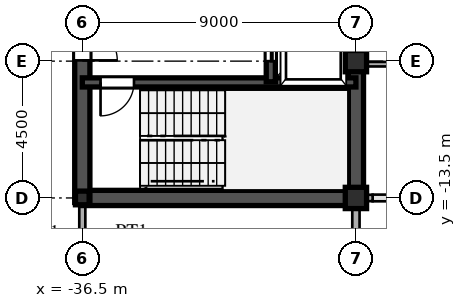
"""IFC4 building model, lengths in metres.
Left out: names, types, materials, properties, quantities, classifications, styles, units other than length and angle.
Written with IfcOpenShell. Run it as: python <this file> out.ifc"""

import sys

from ifc_helpers import new_model, si_unit, direction, frame, frame_2d, origin, origin_2d, place, context, subcontext, project, spatial, rectangle, hollow_rectangle, i_section, extrude, source, transform, mapped, element, fill, save


model = new_model("IFC4")
c1 = context("Model", 3, precision=1e-05, world=origin(), true_north=direction((0.0, 1.0)))
c2 = subcontext(c1, "Body", "Model", "MODEL_VIEW")
j1 = project(units=[si_unit("LENGTHUNIT", "METRE"), si_unit("PLANEANGLEUNIT", "RADIAN")], contexts=[c1])
p1 = place(None, origin())
s1 = spatial("IfcSite", under=j1, at=p1, CompositionType="ELEMENT")
p2 = place(p1, origin())
s2 = spatial("IfcBuilding", under=s1, at=p2, CompositionType="ELEMENT")
p3 = place(p2, frame((0.0, 0.0, 265.65)))
s3 = spatial("IfcBuildingStorey", under=s2, at=p3, CompositionType="ELEMENT", Elevation=265.65)
m1 = source(origin(), c2, "Body", "SweptSolid", [
    extrude(hollow_rectangle(XDim=0.7, YDim=0.7, WallThickness=0.03, at=origin_2d()), origin(), (0.0, 0.0, 1.0), 3.75),
])
for number, where, z_axis, x_axis in (
    (1, (-27.5, -13.5, 0.0), (0.0, 0.0, 1.0), (1.0, 0.0, 0.0)),
    (2, (-27.5, -9.0, 0.0), (0.0, 0.0, 1.0), (1.0, 0.0, 0.0)),
):
    element("IfcColumn", number, at=place(p3, frame(where, z_axis=z_axis, x_axis=x_axis)), inside=s3, PredefinedType="COLUMN", context=c2, shape_type="MappedRepresentation", body=[
        mapped(m1, transform((0.0, 0.0, 0.0), scale=1.0)),
    ])
m2 = source(origin(), c2, "Body", "SweptSolid", [
    extrude(i_section(OverallWidth=0.45, OverallDepth=0.45, WebThickness=0.016, FlangeThickness=0.025, at=origin_2d()), origin(), (0.0, 0.0, 1.0), 3.75),
])
p4 = place(p3, frame((-36.5, -13.5, 0.0), z_axis=(0.0, 0.0, 1.0), x_axis=(1.0, 0.0, 0.0)))
e3 = element("IfcColumn", 3, at=p4, inside=s3, PredefinedType="COLUMN", context=c2, shape_type="MappedRepresentation", body=[
    mapped(m2, transform((0.0, 0.0, 0.0), scale=1.0)),
])
p5 = place(p3, frame((-27.5, -15.98, 0.0), z_axis=(0.0, 0.0, 1.0), x_axis=(0.0, 1.0, 0.0)))
e4 = element("IfcWall", 4, at=p5, inside=s3, PredefinedType="SOLIDWALL", context=c2, shape_type="SweptSolid", body=[
    extrude(rectangle(XDim=1.605, YDim=0.24, at=frame_2d((0.803, 0.0))), origin(), (0.0, 0.0, 1.0), 3.49),
])
p6 = place(p3, frame((-27.5, -14.375, 0.0), z_axis=(0.0, 0.0, 1.0), x_axis=(0.0, 1.0, 0.0)))
e5 = element("IfcWall", 5, at=p6, inside=s3, PredefinedType="SOLIDWALL", context=c2, shape_type="SweptSolid", body=[
    extrude(rectangle(XDim=0.62, YDim=0.24, at=frame_2d((0.31, 0.0))), origin(), (0.0, 0.0, 1.0), 2.99),
])
p7 = place(p3, frame((-27.49, -13.5, 0.0), z_axis=(0.0, 0.0, 1.0), x_axis=(1.0, 0.0, 0.0)))
e6 = element("IfcWall", 6, at=p7, inside=s3, PredefinedType="SOLIDWALL", context=c2, shape_type="SweptSolid", body=[
    extrude(rectangle(XDim=0.54, YDim=0.21, at=frame_2d((0.27, 0.0))), origin(), (0.0, 0.0, 1.0), 2.99),
])
p8 = place(p3, frame((-27.5, -13.5, 0.0), z_axis=(0.0, 0.0, 1.0), x_axis=(0.0, 1.0, 0.0)))
e7 = element("IfcWall", 7, at=p8, inside=s3, PredefinedType="SHEAR", context=c2, shape_type="SweptSolid", body=[
    extrude(rectangle(XDim=12.2, YDim=0.5, at=frame_2d((6.1, 0.0))), origin(), (0.0, 0.0, 1.0), 3.49),
])
p9 = place(p3, frame((-36.5, -13.5, 0.0), z_axis=(0.0, 0.0, 1.0), x_axis=(1.0, 0.0, 0.0)))
e8 = element("IfcWall", 8, at=p9, inside=s3, PredefinedType="SHEAR", context=c2, shape_type="SweptSolid", body=[
    extrude(rectangle(XDim=9.0, YDim=0.5, at=frame_2d((4.5, 0.0))), origin(), (0.0, 0.0, 1.0), 3.49),
])
p10 = place(p3, frame((-36.5, -13.65, 0.0), z_axis=(0.0, 0.0, 1.0), x_axis=(0.0, 1.0, 0.0)))
e9 = element("IfcWall", 9, at=p10, inside=s3, PredefinedType="SHEAR", context=c2, shape_type="SweptSolid", body=[
    extrude(rectangle(XDim=7.15, YDim=0.5, at=frame_2d((3.575, 0.0))), origin(), (0.0, 0.0, 1.0), 3.49),
])
p11 = place(p10, frame((4.675, 0.0, 0.0)))
e10 = element("IfcOpeningElement", 10, at=p11, cuts=e9, PredefinedType="OPENING", context=c2, shape_type="SweptSolid", body=[
    extrude(rectangle(XDim=1.15, YDim=2.2, at=frame_2d((0.575, 1.1))), frame((0.0, 0.26, 0.0), z_axis=(0.0, -1.0, 0.0), x_axis=(1.0, 0.0, 0.0)), (0.0, 0.0, 1.0), 0.52),
])
p12 = place(p3, frame((-36.5, -9.7, 0.0), z_axis=(0.0, 0.0, 1.0), x_axis=(1.0, 0.0, 0.0)))
e11 = element("IfcWall", 11, at=p12, inside=s3, PredefinedType="SHEAR", context=c2, shape_type="SweptSolid", body=[
    extrude(rectangle(XDim=9.0, YDim=0.3, at=frame_2d((4.5, 0.0))), origin(), (0.0, 0.0, 1.0), 3.49),
])
p13 = place(p12, frame((0.6, 0.0, 0.0)))
e12 = element("IfcOpeningElement", 12, at=p13, cuts=e11, PredefinedType="OPENING", context=c2, shape_type="SweptSolid", body=[
    extrude(rectangle(XDim=1.1, YDim=2.2, at=frame_2d((0.55, 1.1))), frame((0.0, 0.16, 0.0), z_axis=(0.0, -1.0, 0.0), x_axis=(1.0, 0.0, 0.0)), (0.0, 0.0, 1.0), 0.32),
])
p14 = place(p3, frame((-30.3, -9.68, 0.0), z_axis=(0.0, 0.0, 1.0), x_axis=(0.0, 1.0, 0.0)))
e13 = element("IfcWall", 13, at=p14, inside=s3, PredefinedType="SHEAR", context=c2, shape_type="SweptSolid", body=[
    extrude(rectangle(XDim=2.56, YDim=0.3, at=frame_2d((1.28, 0.0))), origin(), (0.0, 0.0, 1.0), 3.49),
])
p15 = place(p14, frame((0.68, 0.0, 0.0)))
e14 = element("IfcOpeningElement", 14, at=p15, cuts=e13, PredefinedType="OPENING", context=c2, shape_type="SweptSolid", body=[
    extrude(rectangle(XDim=1.2, YDim=2.25, at=frame_2d((0.6, 1.125))), frame((0.0, 0.16, 0.0), z_axis=(0.0, -1.0, 0.0), x_axis=(1.0, 0.0, 0.0)), (0.0, 0.0, 1.0), 0.32),
])
p16 = place(p3, frame((-27.245, -9.1, 0.0), z_axis=(0.0, 0.0, 1.0), x_axis=(1.0, 0.0, 0.0)))
e15 = element("IfcWall", 15, at=p16, inside=s3, PredefinedType="PARTITIONING", context=c2, shape_type="SweptSolid", body=[
    extrude(rectangle(XDim=6.16, YDim=0.15, at=frame_2d((3.08, 0.0))), origin(), (0.0, 0.0, 1.0), 3.49),
])
p17 = place(p16, frame((2.82, 0.0, 0.0)))
e16 = element("IfcOpeningElement", 16, at=p17, cuts=e15, PredefinedType="OPENING", context=c2, shape_type="SweptSolid", body=[
    extrude(rectangle(XDim=0.95, YDim=2.15, at=frame_2d((0.475, 1.075))), frame((0.0, 0.085, 0.0), z_axis=(0.0, -1.0, 0.0), x_axis=(1.0, 0.0, 0.0)), (0.0, 0.0, 1.0), 0.17),
])
p18 = place(p3, frame((-36.5, -15.515, 0.0), z_axis=(0.0, 0.0, 1.0), x_axis=(0.0, 1.0, 0.0)))
e17 = element("IfcWall", 17, at=p18, inside=s3, PredefinedType="PARTITIONING", context=c2, shape_type="SweptSolid", body=[
    extrude(rectangle(XDim=1.76, YDim=0.2, at=frame_2d((0.88, 0.0))), origin(), (0.0, 0.0, 1.0), 2.89),
])
m3 = source(origin(), c2, "Body", "SweptSolid", [
    extrude(rectangle(XDim=1.15, YDim=2.2, at=frame_2d((0.575, 1.1))), frame((0.0, 0.025, 0.0), z_axis=(0.0, -1.0, 0.0), x_axis=(1.0, 0.0, 0.0)), (0.0, 0.0, 1.0), 0.05),
])
p19 = place(p11, frame((1.15, 0.0, 0.0), z_axis=(0.0, 0.0, 1.0), x_axis=(-1.0, 0.0, 0.0)))
e18 = element("IfcDoor", 18, at=p19, inside=s3, OperationType="SINGLE_SWING_LEFT", PredefinedType="DOOR", context=c2, shape_type="MappedRepresentation", body=[
    mapped(m3, transform((0.0, 0.0, 0.0), scale=1.0)),
])
fill(e10, e18)
m4 = source(origin(), c2, "Body", "SweptSolid", [
    extrude(rectangle(XDim=1.1, YDim=2.2, at=frame_2d((0.55, 1.1))), frame((0.0, 0.025, 0.0), z_axis=(0.0, -1.0, 0.0), x_axis=(1.0, 0.0, 0.0)), (0.0, 0.0, 1.0), 0.05),
])
p20 = place(p13, frame((1.1, 0.0, 0.0), z_axis=(0.0, 0.0, 1.0), x_axis=(-1.0, 0.0, 0.0)))
e19 = element("IfcDoor", 19, at=p20, inside=s3, OperationType="SINGLE_SWING_LEFT", PredefinedType="DOOR", context=c2, shape_type="MappedRepresentation", body=[
    mapped(m4, transform((0.0, 0.0, 0.0), scale=1.0)),
])
fill(e12, e19)
m5 = source(origin(), c2, "Body", "SweptSolid", [
    extrude(rectangle(XDim=1.2, YDim=2.25, at=frame_2d((0.6, 1.125))), frame((0.0, 0.025, 0.0), z_axis=(0.0, -1.0, 0.0), x_axis=(1.0, 0.0, 0.0)), (0.0, 0.0, 1.0), 0.05),
])
p21 = place(p15, origin())
e20 = element("IfcDoor", 20, at=p21, inside=s3, OperationType="DOUBLE_DOOR_SLIDING", PredefinedType="DOOR", context=c2, shape_type="MappedRepresentation", body=[
    mapped(m5, transform((0.0, 0.0, 0.0), scale=1.0)),
])
fill(e14, e20)
save(model, sys.argv[1])
